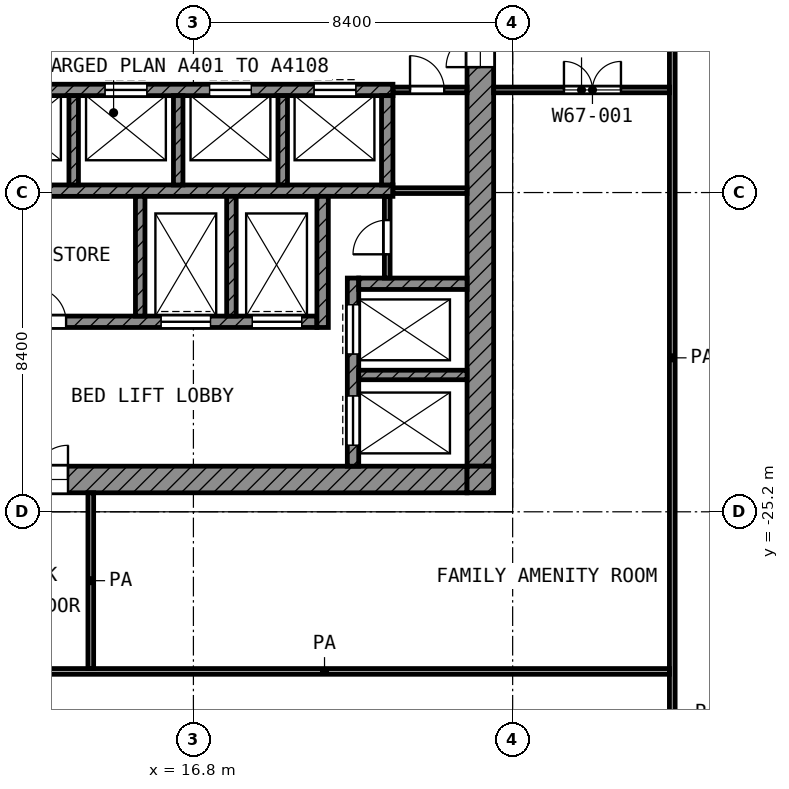
"""IFC4 building model, lengths in metres.
Left out: names, types, materials, properties, quantities, classifications, styles, units other than length and angle.
Written with IfcOpenShell. Run it as: python <this file> out.ifc"""

import sys

from ifc_helpers import new_model, si_unit, direction, frame, frame_2d, origin, place, context, subcontext, project, spatial, rectangle, extrude, element, fill, save


model = new_model("IFC4")
c1 = context("Model", 3, precision=1e-05, world=origin(), true_north=direction((0.0, 1.0)))
c2 = subcontext(c1, "Body", "Model", "MODEL_VIEW")
j1 = project(units=[si_unit("LENGTHUNIT", "METRE"), si_unit("PLANEANGLEUNIT", "RADIAN")], contexts=[c1])
p1 = place(None, origin())
s1 = spatial("IfcSite", under=j1, at=p1, CompositionType="ELEMENT")
p2 = place(p1, origin())
s2 = spatial("IfcBuilding", under=s1, at=p2, CompositionType="ELEMENT")
p3 = place(p2, frame((0.0, 0.0, 290.2)))
s3 = spatial("IfcBuildingStorey", under=s2, at=p3, CompositionType="ELEMENT", Elevation=290.2)
p4 = place(p3, frame((24.35, -24.0, 0.0), z_axis=(0.0, 0.0, 1.0), x_axis=(0.0, 1.0, 0.0)))
e1 = element("IfcWall", 1, at=p4, inside=s3, PredefinedType="SHEAR", context=c2, shape_type="SweptSolid", body=[
    extrude(rectangle(XDim=18.6, YDim=0.7, at=frame_2d((9.3, 0.0))), origin(), (0.0, 0.0, 1.0), 3.6),
])
p5 = place(p4, frame((10.5, 0.0, 0.0)))
e2 = element("IfcOpeningElement", 2, at=p5, cuts=e1, PredefinedType="OPENING", context=c2, shape_type="SweptSolid", body=[
    extrude(rectangle(XDim=1.8, YDim=2.1, at=frame_2d((0.9, 1.05))), frame((0.0, 0.36, 0.0), z_axis=(0.0, -1.0, 0.0), x_axis=(1.0, 0.0, 0.0)), (0.0, 0.0, 1.0), 0.72),
])
p6 = place(p3, frame((5.4, -24.35, 0.0), z_axis=(0.0, 0.0, 1.0), x_axis=(1.0, 0.0, 0.0)))
e3 = element("IfcWall", 3, at=p6, inside=s3, PredefinedType="SHEAR", context=c2, shape_type="SweptSolid", body=[
    extrude(rectangle(XDim=18.6, YDim=0.7, at=frame_2d((9.3, 0.0))), origin(), (0.0, 0.0, 1.0), 3.6),
])
p7 = place(p6, frame((6.3, 0.0, 0.0)))
e4 = element("IfcOpeningElement", 4, at=p7, cuts=e3, PredefinedType="OPENING", context=c2, shape_type="SweptSolid", body=[
    extrude(rectangle(XDim=1.8, YDim=2.1, at=frame_2d((0.9, 1.05))), frame((0.0, 0.36, 0.0), z_axis=(0.0, -1.0, 0.0), x_axis=(1.0, 0.0, 0.0)), (0.0, 0.0, 1.0), 0.72),
])
p8 = place(p3, frame((24.35, -24.7, 0.0), z_axis=(0.0, 0.0, 1.0), x_axis=(0.0, 1.0, 0.0)))
e5 = element("IfcWall", 5, at=p8, inside=s3, PredefinedType="SHEAR", context=c2, shape_type="SweptSolid", body=[
    extrude(rectangle(XDim=0.7, YDim=0.7, at=frame_2d((0.35, 0.0))), origin(), (0.0, 0.0, 1.0), 3.6),
])
p9 = place(p3, frame((5.4, -14.1, 0.0), z_axis=(0.0, 0.0, 1.0), x_axis=(1.0, 0.0, 0.0)))
e6 = element("IfcWall", 6, at=p9, inside=s3, PredefinedType="SHEAR", context=c2, shape_type="SweptSolid", body=[
    extrude(rectangle(XDim=16.65, YDim=0.3, at=frame_2d((8.325, 0.0))), origin(), (0.0, 0.0, 1.0), 3.6),
])
p10 = place(p9, frame((6.325, 0.0, 0.0)))
e7 = element("IfcOpeningElement", 7, at=p10, cuts=e6, PredefinedType="OPENING", context=c2, shape_type="SweptSolid", body=[
    extrude(rectangle(XDim=1.1, YDim=2.1, at=frame_2d((0.55, 1.05))), frame((0.0, 0.16, 0.0), z_axis=(0.0, -1.0, 0.0), x_axis=(1.0, 0.0, 0.0)), (0.0, 0.0, 1.0), 0.32),
])
p11 = place(p9, frame((9.075, 0.0, 0.0)))
e8 = element("IfcOpeningElement", 8, at=p11, cuts=e6, PredefinedType="OPENING", context=c2, shape_type="SweptSolid", body=[
    extrude(rectangle(XDim=1.1, YDim=2.1, at=frame_2d((0.55, 1.05))), frame((0.0, 0.16, 0.0), z_axis=(0.0, -1.0, 0.0), x_axis=(1.0, 0.0, 0.0)), (0.0, 0.0, 1.0), 0.32),
])
p12 = place(p9, frame((11.825, 0.0, 0.0)))
e9 = element("IfcOpeningElement", 9, at=p12, cuts=e6, PredefinedType="OPENING", context=c2, shape_type="SweptSolid", body=[
    extrude(rectangle(XDim=1.1, YDim=2.1, at=frame_2d((0.55, 1.05))), frame((0.0, 0.16, 0.0), z_axis=(0.0, -1.0, 0.0), x_axis=(1.0, 0.0, 0.0)), (0.0, 0.0, 1.0), 0.32),
])
p13 = place(p9, frame((14.575, 0.0, 0.0)))
e10 = element("IfcOpeningElement", 10, at=p13, cuts=e6, PredefinedType="OPENING", context=c2, shape_type="SweptSolid", body=[
    extrude(rectangle(XDim=1.1, YDim=2.1, at=frame_2d((0.55, 1.05))), frame((0.0, 0.16, 0.0), z_axis=(0.0, -1.0, 0.0), x_axis=(1.0, 0.0, 0.0)), (0.0, 0.0, 1.0), 0.32),
])
p14 = place(p9, frame((2.3, 0.0, 0.0)))
e11 = element("IfcOpeningElement", 11, at=p14, cuts=e6, PredefinedType="OPENING", context=c2, shape_type="SweptSolid", body=[
    extrude(rectangle(XDim=0.9, YDim=2.1, at=frame_2d((0.45, 1.05))), frame((0.0, 0.16, 0.0), z_axis=(0.0, -1.0, 0.0), x_axis=(1.0, 0.0, 0.0)), (0.0, 0.0, 1.0), 0.32),
])
p15 = place(p3, frame((5.4, -16.75, 0.0), z_axis=(0.0, 0.0, 1.0), x_axis=(1.0, 0.0, 0.0)))
e12 = element("IfcWall", 12, at=p15, inside=s3, PredefinedType="SHEAR", context=c2, shape_type="SweptSolid", body=[
    extrude(rectangle(XDim=16.65, YDim=0.3, at=frame_2d((8.325, 0.0))), origin(), (0.0, 0.0, 1.0), 3.6),
])
p16 = place(p3, frame((5.4, -20.2, 0.0), z_axis=(0.0, 0.0, 1.0), x_axis=(1.0, 0.0, 0.0)))
e13 = element("IfcWall", 13, at=p16, inside=s3, PredefinedType="SHEAR", context=c2, shape_type="SweptSolid", body=[
    extrude(rectangle(XDim=14.65, YDim=0.3, at=frame_2d((7.325, 0.0))), origin(), (0.0, 0.0, 1.0), 3.6),
])
p17 = place(p16, frame((10.55, 0.0, 0.0)))
e14 = element("IfcOpeningElement", 14, at=p17, cuts=e13, PredefinedType="OPENING", context=c2, shape_type="SweptSolid", body=[
    extrude(rectangle(XDim=1.3, YDim=2.1, at=frame_2d((0.65, 1.05))), frame((0.0, 0.16, 0.0), z_axis=(0.0, -1.0, 0.0), x_axis=(1.0, 0.0, 0.0)), (0.0, 0.0, 1.0), 0.32),
])
p18 = place(p16, frame((12.95, 0.0, 0.0)))
e15 = element("IfcOpeningElement", 15, at=p18, cuts=e13, PredefinedType="OPENING", context=c2, shape_type="SweptSolid", body=[
    extrude(rectangle(XDim=1.3, YDim=2.1, at=frame_2d((0.65, 1.05))), frame((0.0, 0.16, 0.0), z_axis=(0.0, -1.0, 0.0), x_axis=(1.0, 0.0, 0.0)), (0.0, 0.0, 1.0), 0.32),
])
p19 = place(p16, frame((0.55, 0.0, 0.0)))
e16 = element("IfcOpeningElement", 16, at=p19, cuts=e13, PredefinedType="OPENING", context=c2, shape_type="SweptSolid", body=[
    extrude(rectangle(XDim=1.3, YDim=2.1, at=frame_2d((0.65, 1.05))), frame((0.0, 0.16, 0.0), z_axis=(0.0, -1.0, 0.0), x_axis=(1.0, 0.0, 0.0)), (0.0, 0.0, 1.0), 0.32),
])
p20 = place(p16, frame((2.95, 0.0, 0.0)))
e17 = element("IfcOpeningElement", 17, at=p20, cuts=e13, PredefinedType="OPENING", context=c2, shape_type="SweptSolid", body=[
    extrude(rectangle(XDim=1.3, YDim=2.1, at=frame_2d((0.65, 1.05))), frame((0.0, 0.16, 0.0), z_axis=(0.0, -1.0, 0.0), x_axis=(1.0, 0.0, 0.0)), (0.0, 0.0, 1.0), 0.32),
])
p21 = place(p16, frame((7.15, 0.0, 0.0)))
e18 = element("IfcOpeningElement", 18, at=p21, cuts=e13, PredefinedType="OPENING", context=c2, shape_type="SweptSolid", body=[
    extrude(rectangle(XDim=0.9, YDim=2.1, at=frame_2d((0.45, 1.05))), frame((0.0, 0.16, 0.0), z_axis=(0.0, -1.0, 0.0), x_axis=(1.0, 0.0, 0.0)), (0.0, 0.0, 1.0), 0.32),
])
p22 = place(p3, frame((20.2, -20.35, 0.0), z_axis=(0.0, 0.0, 1.0), x_axis=(0.0, 1.0, 0.0)))
e19 = element("IfcWall", 19, at=p22, inside=s3, PredefinedType="SHEAR", context=c2, shape_type="SweptSolid", body=[
    extrude(rectangle(XDim=3.45, YDim=0.3, at=frame_2d((1.725, 0.0))), origin(), (0.0, 0.0, 1.0), 3.6),
])
p23 = place(p3, frame((21.9, -16.6, 0.0), z_axis=(0.0, 0.0, 1.0), x_axis=(0.0, 1.0, 0.0)))
e20 = element("IfcWall", 20, at=p23, inside=s3, PredefinedType="SHEAR", context=c2, shape_type="SweptSolid", body=[
    extrude(rectangle(XDim=2.35, YDim=0.3, at=frame_2d((1.175, 0.0))), origin(), (0.0, 0.0, 1.0), 3.6),
])
p24 = place(p3, frame((21.15, -19.2, 0.0), z_axis=(0.0, 0.0, 1.0), x_axis=(1.0, 0.0, 0.0)))
e21 = element("IfcWall", 21, at=p24, inside=s3, PredefinedType="SHEAR", context=c2, shape_type="SweptSolid", body=[
    extrude(rectangle(XDim=2.85, YDim=0.3, at=frame_2d((1.425, 0.0))), origin(), (0.0, 0.0, 1.0), 3.6),
])
p25 = place(p3, frame((21.0, -24.0, 0.0), z_axis=(0.0, 0.0, 1.0), x_axis=(0.0, 1.0, 0.0)))
e22 = element("IfcWall", 22, at=p25, inside=s3, PredefinedType="SHEAR", context=c2, shape_type="SweptSolid", body=[
    extrude(rectangle(XDim=4.95, YDim=0.3, at=frame_2d((2.475, 0.0))), origin(), (0.0, 0.0, 1.0), 3.6),
])
p26 = place(p25, frame((2.95, 0.0, 0.0)))
e23 = element("IfcOpeningElement", 23, at=p26, cuts=e22, PredefinedType="OPENING", context=c2, shape_type="SweptSolid", body=[
    extrude(rectangle(XDim=1.3, YDim=2.1, at=frame_2d((0.65, 1.05))), frame((0.0, 0.16, 0.0), z_axis=(0.0, -1.0, 0.0), x_axis=(1.0, 0.0, 0.0)), (0.0, 0.0, 1.0), 0.32),
])
p27 = place(p25, frame((0.55, 0.0, 0.0)))
e24 = element("IfcOpeningElement", 24, at=p27, cuts=e22, PredefinedType="OPENING", context=c2, shape_type="SweptSolid", body=[
    extrude(rectangle(XDim=1.3, YDim=2.1, at=frame_2d((0.65, 1.05))), frame((0.0, 0.16, 0.0), z_axis=(0.0, -1.0, 0.0), x_axis=(1.0, 0.0, 0.0)), (0.0, 0.0, 1.0), 0.32),
])
p28 = place(p3, frame((21.15, -21.6, 0.0), z_axis=(0.0, 0.0, 1.0), x_axis=(1.0, 0.0, 0.0)))
e25 = element("IfcWall", 25, at=p28, inside=s3, PredefinedType="SHEAR", context=c2, shape_type="SweptSolid", body=[
    extrude(rectangle(XDim=2.85, YDim=0.25, at=frame_2d((1.425, 0.0))), origin(), (0.0, 0.0, 1.0), 3.6),
])
for number, where, z_axis, x_axis in (
    (26, (15.4, -20.05, 0.0), (0.0, 0.0, 1.0), (0.0, 1.0, 0.0)),
    (27, (17.8, -20.05, 0.0), (0.0, 0.0, 1.0), (0.0, 1.0, 0.0)),
):
    element("IfcWall", number, at=place(p3, frame(where, z_axis=z_axis, x_axis=x_axis)), inside=s3, PredefinedType="SHEAR", context=c2, shape_type="SweptSolid", body=[
        extrude(rectangle(XDim=3.15, YDim=0.25, at=frame_2d((1.575, 0.0))), origin(), (0.0, 0.0, 1.0), 3.6),
    ])
for number, where, z_axis, x_axis in (
    (28, (13.65, -16.6, 0.0), (0.0, 0.0, 1.0), (0.0, 1.0, 0.0)),
    (29, (16.4, -16.6, 0.0), (0.0, 0.0, 1.0), (0.0, 1.0, 0.0)),
    (30, (19.15, -16.6, 0.0), (0.0, 0.0, 1.0), (0.0, 1.0, 0.0)),
):
    element("IfcWall", number, at=place(p3, frame(where, z_axis=z_axis, x_axis=x_axis)), inside=s3, PredefinedType="SHEAR", context=c2, shape_type="SweptSolid", body=[
        extrude(rectangle(XDim=2.35, YDim=0.25, at=frame_2d((1.175, 0.0))), origin(), (0.0, 0.0, 1.0), 3.6),
    ])
p29 = place(p3, frame((21.9, -19.05, 0.0), z_axis=(0.0, 0.0, 1.0), x_axis=(0.0, 1.0, 0.0)))
e31 = element("IfcWall", 31, at=p29, inside=s3, PredefinedType="PARTITIONING", context=c2, shape_type="SweptSolid", body=[
    extrude(rectangle(XDim=2.15, YDim=0.15, at=frame_2d((1.075, 0.0))), origin(), (0.0, 0.0, 1.0), 3.6),
])
p30 = place(p29, frame((0.625, 0.0, 0.0)))
e32 = element("IfcOpeningElement", 32, at=p30, cuts=e31, PredefinedType="OPENING", context=c2, shape_type="SweptSolid", body=[
    extrude(rectangle(XDim=0.9, YDim=2.1, at=frame_2d((0.45, 1.05))), frame((0.0, 0.085, 0.0), z_axis=(0.0, -1.0, 0.0), x_axis=(1.0, 0.0, 0.0)), (0.0, 0.0, 1.0), 0.17),
])
p31 = place(p3, frame((22.05, -16.75, 0.0), z_axis=(0.0, 0.0, 1.0), x_axis=(1.0, 0.0, 0.0)))
e33 = element("IfcWall", 33, at=p31, inside=s3, PredefinedType="PARTITIONING", context=c2, shape_type="SweptSolid", body=[
    extrude(rectangle(XDim=1.95, YDim=0.15, at=frame_2d((0.975, 0.0))), origin(), (0.0, 0.0, 1.0), 3.6),
])
p32 = place(p3, frame((22.05, -14.1, 0.0), z_axis=(0.0, 0.0, 1.0), x_axis=(1.0, 0.0, 0.0)))
e34 = element("IfcWall", 34, at=p32, inside=s3, PredefinedType="PARTITIONING", context=c2, shape_type="SweptSolid", body=[
    extrude(rectangle(XDim=1.95, YDim=0.15, at=frame_2d((0.975, 0.0))), origin(), (0.0, 0.0, 1.0), 3.6),
])
p33 = place(p32, frame((0.45, 0.0, 0.0)))
e35 = element("IfcOpeningElement", 35, at=p33, cuts=e34, PredefinedType="OPENING", context=c2, shape_type="SweptSolid", body=[
    extrude(rectangle(XDim=0.9, YDim=2.1, at=frame_2d((0.45, 1.05))), frame((0.0, 0.085, 0.0), z_axis=(0.0, -1.0, 0.0), x_axis=(1.0, 0.0, 0.0)), (0.0, 0.0, 1.0), 0.17),
])
p34 = place(p3, frame((11.175, -29.4, 0.0), z_axis=(0.0, 0.0, 1.0), x_axis=(1.0, 0.0, 0.0)))
e36 = element("IfcWall", 36, at=p34, inside=s3, PredefinedType="PARTITIONING", context=c2, shape_type="SweptSolid", body=[
    extrude(rectangle(XDim=18.15, YDim=0.15, at=frame_2d((9.075, 0.0))), origin(), (0.0, 0.0, 1.0), 3.6),
])
p35 = place(p3, frame((24.7, -14.1, 0.0), z_axis=(0.0, 0.0, 1.0), x_axis=(1.0, 0.0, 0.0)))
e37 = element("IfcWall", 37, at=p35, inside=s3, PredefinedType="PARTITIONING", context=c2, shape_type="SweptSolid", body=[
    extrude(rectangle(XDim=4.625, YDim=0.15, at=frame_2d((2.312, 0.0))), origin(), (0.0, 0.0, 1.0), 3.6),
])
p36 = place(p35, frame((1.85, 0.0, 0.0)))
e38 = element("IfcOpeningElement", 38, at=p36, cuts=e37, PredefinedType="OPENING", context=c2, shape_type="SweptSolid", body=[
    extrude(rectangle(XDim=1.5, YDim=2.1, at=frame_2d((0.75, 1.05))), frame((0.0, 0.085, 0.0), z_axis=(0.0, -1.0, 0.0), x_axis=(1.0, 0.0, 0.0)), (0.0, 0.0, 1.0), 0.17),
])
p37 = place(p3, frame((14.1, -29.325, 0.0), z_axis=(0.0, 0.0, 1.0), x_axis=(0.0, 1.0, 0.0)))
e39 = element("IfcWall", 39, at=p37, inside=s3, PredefinedType="PARTITIONING", context=c2, shape_type="SweptSolid", body=[
    extrude(rectangle(XDim=4.625, YDim=0.15, at=frame_2d((2.312, 0.0))), origin(), (0.0, 0.0, 1.0), 3.6),
])
p38 = place(p3, frame((29.4, -31.198, 0.0), z_axis=(0.0, 0.0, 1.0), x_axis=(0.0, 1.0, 0.0)))
e40 = element("IfcWall", 40, at=p38, inside=s3, PredefinedType="PARTITIONING", context=c2, shape_type="SweptSolid", body=[
    extrude(rectangle(XDim=20.098, YDim=0.15, at=frame_2d((10.049, 0.0))), origin(), (0.0, 0.0, 1.0), 3.6),
])
p39 = place(p11, origin())
e41 = element("IfcDoor", 41, at=p39, inside=s3, OperationType="DOUBLE_DOOR_SLIDING", PredefinedType="DOOR", context=c2, shape_type="SweptSolid", body=[
    extrude(rectangle(XDim=1.1, YDim=2.1, at=frame_2d((0.55, 1.05))), frame((0.0, 0.025, 0.0), z_axis=(0.0, -1.0, 0.0), x_axis=(1.0, 0.0, 0.0)), (0.0, 0.0, 1.0), 0.05),
])
fill(e8, e41)
p40 = place(p12, origin())
e42 = element("IfcDoor", 42, at=p40, inside=s3, OperationType="DOUBLE_DOOR_SLIDING", PredefinedType="DOOR", context=c2, shape_type="SweptSolid", body=[
    extrude(rectangle(XDim=1.1, YDim=2.1, at=frame_2d((0.55, 1.05))), frame((0.0, 0.025, 0.0), z_axis=(0.0, -1.0, 0.0), x_axis=(1.0, 0.0, 0.0)), (0.0, 0.0, 1.0), 0.05),
])
fill(e9, e42)
p41 = place(p13, origin())
e43 = element("IfcDoor", 43, at=p41, inside=s3, OperationType="DOUBLE_DOOR_SLIDING", PredefinedType="DOOR", context=c2, shape_type="SweptSolid", body=[
    extrude(rectangle(XDim=1.1, YDim=2.1, at=frame_2d((0.55, 1.05))), frame((0.0, 0.025, 0.0), z_axis=(0.0, -1.0, 0.0), x_axis=(1.0, 0.0, 0.0)), (0.0, 0.0, 1.0), 0.05),
])
fill(e10, e43)
p42 = place(p26, origin())
e44 = element("IfcDoor", 44, at=p42, inside=s3, OperationType="DOUBLE_DOOR_SLIDING", PredefinedType="DOOR", context=c2, shape_type="SweptSolid", body=[
    extrude(rectangle(XDim=1.3, YDim=2.1, at=frame_2d((0.65, 1.05))), frame((0.0, 0.025, 0.0), z_axis=(0.0, -1.0, 0.0), x_axis=(1.0, 0.0, 0.0)), (0.0, 0.0, 1.0), 0.05),
])
fill(e23, e44)
p43 = place(p27, origin())
e45 = element("IfcDoor", 45, at=p43, inside=s3, OperationType="DOUBLE_DOOR_SLIDING", PredefinedType="DOOR", context=c2, shape_type="SweptSolid", body=[
    extrude(rectangle(XDim=1.3, YDim=2.1, at=frame_2d((0.65, 1.05))), frame((0.0, 0.025, 0.0), z_axis=(0.0, -1.0, 0.0), x_axis=(1.0, 0.0, 0.0)), (0.0, 0.0, 1.0), 0.05),
])
fill(e24, e45)
p44 = place(p17, origin())
e46 = element("IfcDoor", 46, at=p44, inside=s3, OperationType="DOUBLE_DOOR_SLIDING", PredefinedType="DOOR", context=c2, shape_type="SweptSolid", body=[
    extrude(rectangle(XDim=1.3, YDim=2.1, at=frame_2d((0.65, 1.05))), frame((0.0, 0.025, 0.0), z_axis=(0.0, -1.0, 0.0), x_axis=(1.0, 0.0, 0.0)), (0.0, 0.0, 1.0), 0.05),
])
fill(e14, e46)
p45 = place(p18, origin())
e47 = element("IfcDoor", 47, at=p45, inside=s3, OperationType="DOUBLE_DOOR_SLIDING", PredefinedType="DOOR", context=c2, shape_type="SweptSolid", body=[
    extrude(rectangle(XDim=1.3, YDim=2.1, at=frame_2d((0.65, 1.05))), frame((0.0, 0.025, 0.0), z_axis=(0.0, -1.0, 0.0), x_axis=(1.0, 0.0, 0.0)), (0.0, 0.0, 1.0), 0.05),
])
fill(e15, e47)
p46 = place(p5, origin())
e48 = element("IfcDoor", 48, at=p46, inside=s3, OperationType="DOUBLE_DOOR_SINGLE_SWING", PredefinedType="DOOR", context=c2, shape_type="SweptSolid", body=[
    extrude(rectangle(XDim=1.8, YDim=2.1, at=frame_2d((0.9, 1.05))), frame((0.0, 0.025, 0.0), z_axis=(0.0, -1.0, 0.0), x_axis=(1.0, 0.0, 0.0)), (0.0, 0.0, 1.0), 0.05),
])
fill(e2, e48)
p47 = place(p7, origin())
e49 = element("IfcDoor", 49, at=p47, inside=s3, OperationType="DOUBLE_DOOR_SINGLE_SWING", PredefinedType="DOOR", context=c2, shape_type="SweptSolid", body=[
    extrude(rectangle(XDim=1.8, YDim=2.1, at=frame_2d((0.9, 1.05))), frame((0.0, 0.025, 0.0), z_axis=(0.0, -1.0, 0.0), x_axis=(1.0, 0.0, 0.0)), (0.0, 0.0, 1.0), 0.05),
])
fill(e4, e49)
p48 = place(p33, origin())
e50 = element("IfcDoor", 50, at=p48, inside=s3, OperationType="SINGLE_SWING_LEFT", PredefinedType="DOOR", context=c2, shape_type="SweptSolid", body=[
    extrude(rectangle(XDim=0.9, YDim=2.1, at=frame_2d((0.45, 1.05))), frame((0.0, 0.025, 0.0), z_axis=(0.0, -1.0, 0.0), x_axis=(1.0, 0.0, 0.0)), (0.0, 0.0, 1.0), 0.05),
])
fill(e35, e50)
p49 = place(p30, origin())
e51 = element("IfcDoor", 51, at=p49, inside=s3, OperationType="SINGLE_SWING_LEFT", PredefinedType="DOOR", context=c2, shape_type="SweptSolid", body=[
    extrude(rectangle(XDim=0.9, YDim=2.1, at=frame_2d((0.45, 1.05))), frame((0.0, 0.025, 0.0), z_axis=(0.0, -1.0, 0.0), x_axis=(1.0, 0.0, 0.0)), (0.0, 0.0, 1.0), 0.05),
])
fill(e32, e51)
p50 = place(p21, origin())
e52 = element("IfcDoor", 52, at=p50, inside=s3, OperationType="SINGLE_SWING_LEFT", PredefinedType="DOOR", context=c2, shape_type="SweptSolid", body=[
    extrude(rectangle(XDim=0.9, YDim=2.1, at=frame_2d((0.45, 1.05))), frame((0.0, 0.025, 0.0), z_axis=(0.0, -1.0, 0.0), x_axis=(1.0, 0.0, 0.0)), (0.0, 0.0, 1.0), 0.05),
])
fill(e18, e52)
p51 = place(p36, origin())
e53 = element("IfcDoor", 53, at=p51, inside=s3, OperationType="DOUBLE_DOOR_SINGLE_SWING", PredefinedType="DOOR", context=c2, shape_type="SweptSolid", body=[
    extrude(rectangle(XDim=1.5, YDim=2.1, at=frame_2d((0.75, 1.05))), frame((0.0, 0.025, 0.0), z_axis=(0.0, -1.0, 0.0), x_axis=(1.0, 0.0, 0.0)), (0.0, 0.0, 1.0), 0.05),
])
fill(e38, e53)
save(model, sys.argv[1])
